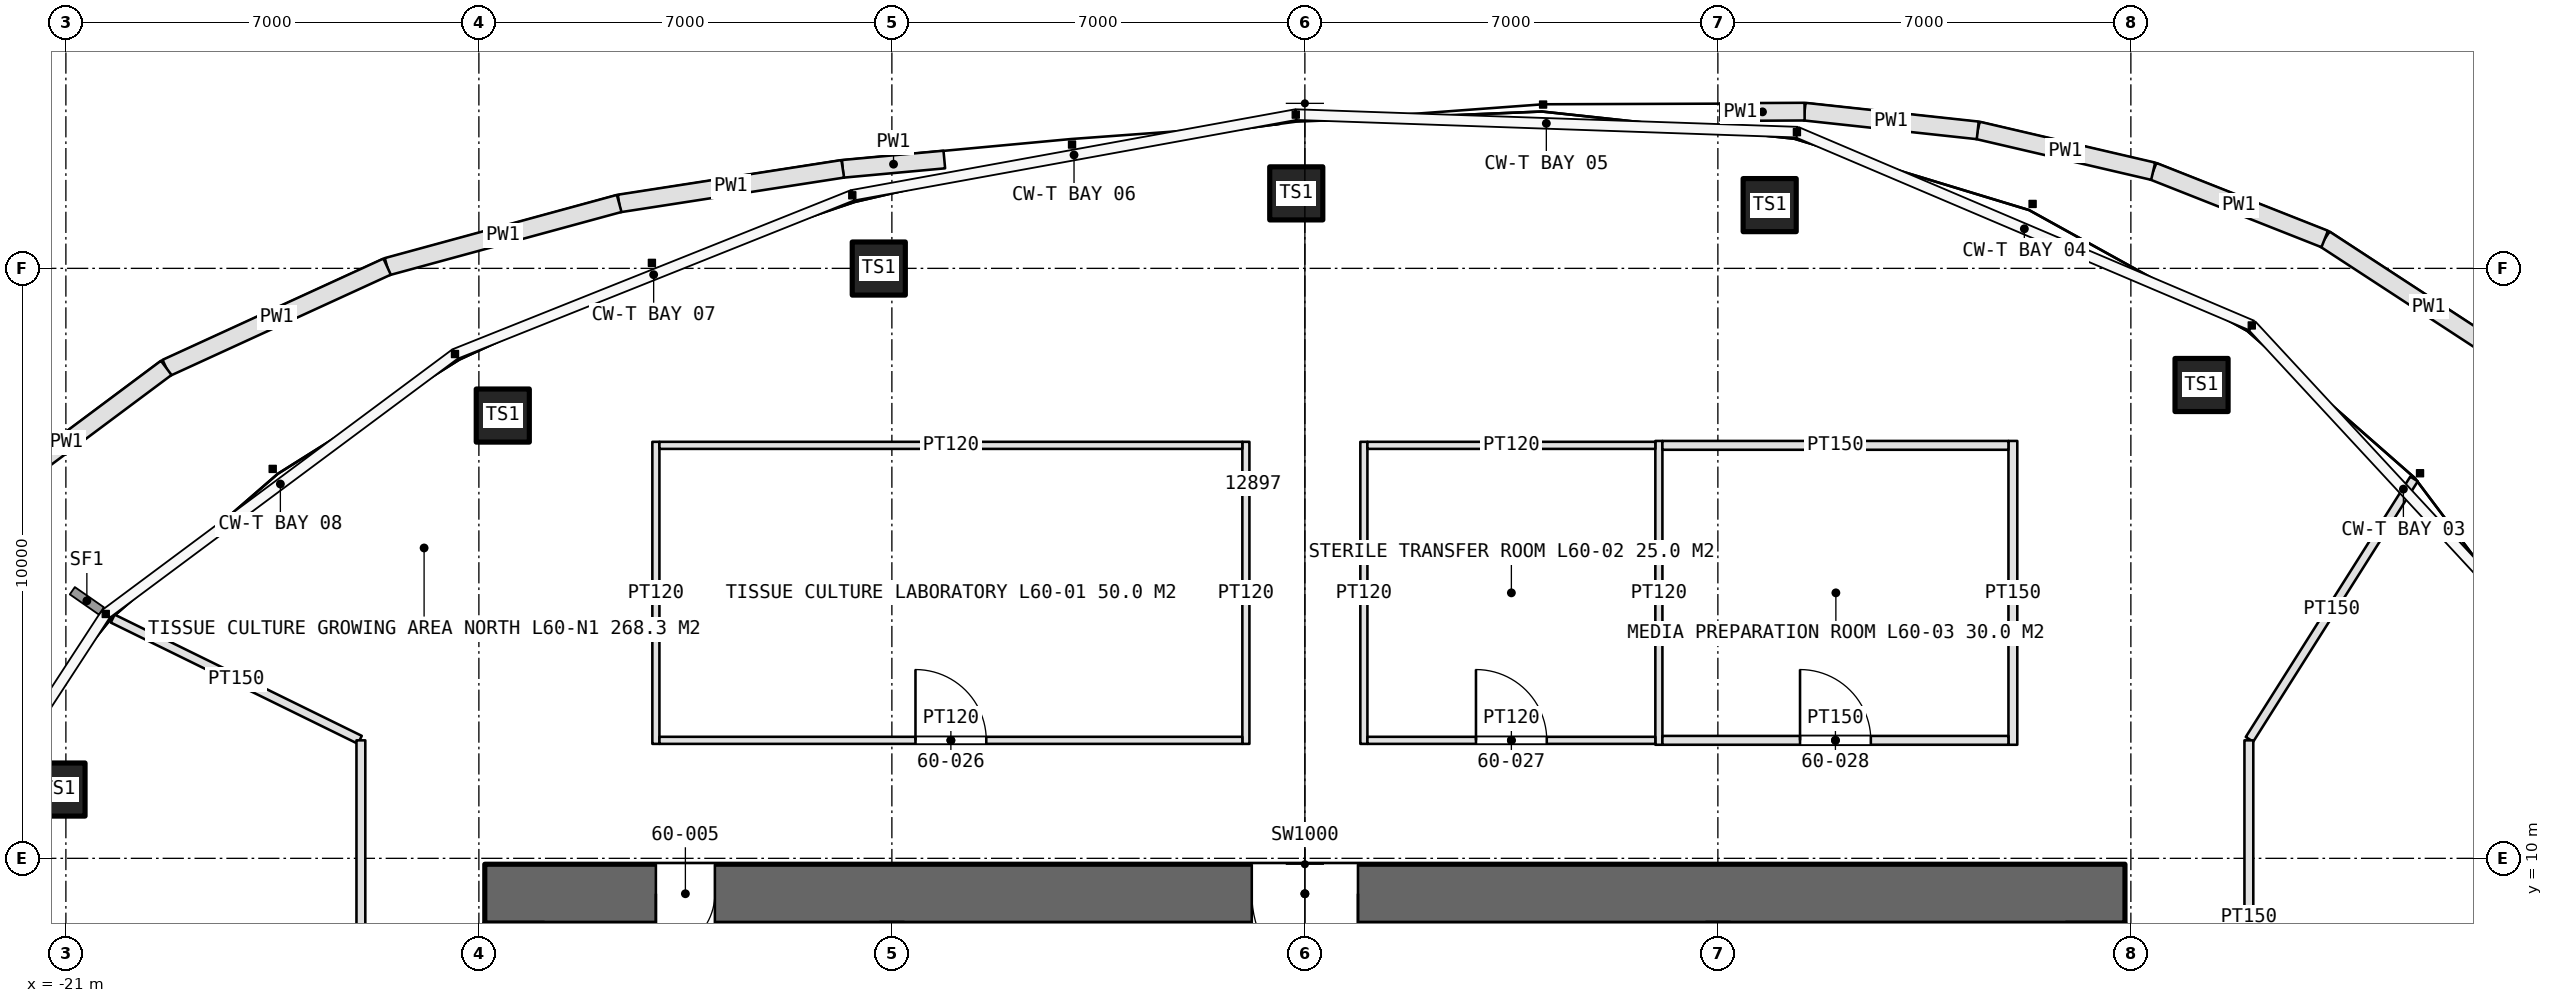
"""IFC4 building model, lengths in metres.
Left out: names, types, materials, properties, quantities, classifications, styles, units other than length and angle.
Written with IfcOpenShell. Run it as: python <this file> out.ifc"""

import sys

from ifc_helpers import new_model, si_unit, direction, frame, frame_2d, origin, origin_2d, place, context, subcontext, project, spatial, rectangle, hollow_rectangle, extrude, element, fill, save


model = new_model("IFC4")
c1 = context("Model", 3, precision=1e-05, world=origin(), true_north=direction((0.0, 1.0)))
c2 = subcontext(c1, "Body", "Model", "MODEL_VIEW")
j1 = project(units=[si_unit("LENGTHUNIT", "METRE"), si_unit("PLANEANGLEUNIT", "RADIAN")], contexts=[c1])
p1 = place(None, origin())
s1 = spatial("IfcSite", under=j1, at=p1, CompositionType="ELEMENT")
p2 = place(p1, origin())
s2 = spatial("IfcBuilding", under=s1, at=p2, CompositionType="ELEMENT")
p3 = place(p2, frame((0.0, 0.0, 271.2)))
s3 = spatial("IfcBuildingStorey", under=s2, at=p3, CompositionType="ELEMENT", Elevation=271.2)
p4 = place(p3, frame((13.9, 9.4, 0.0), z_axis=(0.0, 0.0, 1.0), x_axis=(-1.0, 0.0, 0.0)))
e1 = element("IfcWall", 1, at=p4, inside=s3, PredefinedType="SHEAR", context=c2, shape_type="SweptSolid", body=[
    extrude(rectangle(XDim=27.8, YDim=1.0, at=frame_2d((13.9, 0.0))), origin(), (0.0, 0.0, 1.0), 4.2),
])
p5 = place(p4, frame((23.9, 0.0, 0.0)))
e2 = element("IfcOpeningElement", 2, at=p5, cuts=e1, PredefinedType="OPENING", context=c2, shape_type="SweptSolid", body=[
    extrude(rectangle(XDim=1.0, YDim=2.4, at=frame_2d((0.5, 1.2))), frame((0.0, 0.51, 0.0), z_axis=(0.0, -1.0, 0.0), x_axis=(1.0, 0.0, 0.0)), (0.0, 0.0, 1.0), 1.02),
])
p6 = place(p4, frame((13.0, 0.0, 0.0)))
e3 = element("IfcOpeningElement", 3, at=p6, cuts=e1, PredefinedType="OPENING", context=c2, shape_type="SweptSolid", body=[
    extrude(rectangle(XDim=1.8, YDim=2.4, at=frame_2d((0.9, 1.2))), frame((0.0, 0.51, 0.0), z_axis=(0.0, -1.0, 0.0), x_axis=(1.0, 0.0, 0.0)), (0.0, 0.0, 1.0), 1.02),
])
p7 = place(p3, frame((15.198, 18.023, 0.775), z_axis=(0.0, 0.0, 1.0), x_axis=(1.0, 0.0, 0.0)))
e4 = element("IfcColumn", 4, at=p7, inside=s3, PredefinedType="COLUMN", context=c2, shape_type="SweptSolid", body=[
    extrude(hollow_rectangle(XDim=0.9, YDim=0.9, WallThickness=0.08, at=origin_2d()), origin(), (0.0, 0.0, 1.0), 3.425),
])
for number, where, z_axis, x_axis in (
    (5, (7.878, 21.072, 0.0), (0.0, 0.0, 1.0), (1.0, 0.0, 0.0)),
    (6, (-0.146, 21.271, 0.0), (0.0, 0.0, 1.0), (1.0, 0.0, 0.0)),
    (7, (-7.222, 19.997, 0.0), (0.0, 0.0, 1.0), (1.0, 0.0, 0.0)),
):
    element("IfcColumn", number, at=place(p3, frame(where, z_axis=z_axis, x_axis=x_axis)), inside=s3, PredefinedType="COLUMN", context=c2, shape_type="SweptSolid", body=[
        extrude(hollow_rectangle(XDim=0.9, YDim=0.9, WallThickness=0.08, at=origin_2d()), origin(), (0.0, 0.0, 1.0), 4.2),
    ])
for number, where, z_axis, x_axis in (
    (8, (-13.595, 17.505, 0.775), (0.0, 0.0, 1.0), (1.0, 0.0, 0.0)),
    (9, (-21.125, 11.166, 0.775), (0.0, 0.0, 1.0), (1.0, 0.0, 0.0)),
):
    element("IfcColumn", number, at=place(p3, frame(where, z_axis=z_axis, x_axis=x_axis)), inside=s3, PredefinedType="COLUMN", context=c2, shape_type="SweptSolid", body=[
        extrude(hollow_rectangle(XDim=0.9, YDim=0.9, WallThickness=0.08, at=origin_2d()), origin(), (0.0, 0.0, 1.0), 3.425),
    ])
p8 = place(p3, frame((20.81, 18.197, 0.0), z_axis=(0.0, 0.0, 1.0), x_axis=(-0.837303557123, 0.546738285863, 0.0)))
e10 = element("IfcWall", 10, at=p8, inside=s3, PredefinedType="PARAPET", context=c2, shape_type="SweptSolid", body=[
    extrude(rectangle(XDim=4.209, YDim=0.3, at=frame_2d((2.105, 0.0))), origin(), (0.0, 0.0, 1.0), 1.1),
])
p9 = place(p3, frame((17.285, 20.498, 0.0), z_axis=(0.0, 0.0, 1.0), x_axis=(-0.93007307549, 0.36737456941, 0.0)))
e11 = element("IfcWall", 11, at=p9, inside=s3, PredefinedType="PARAPET", context=c2, shape_type="SweptSolid", body=[
    extrude(rectangle(XDim=3.126, YDim=0.3, at=frame_2d((1.563, 0.0))), origin(), (0.0, 0.0, 1.0), 1.1),
])
p10 = place(p3, frame((14.378, 21.646, 0.0), z_axis=(0.0, 0.0, 1.0), x_axis=(-0.973947271166, 0.226774586291, 0.0)))
e12 = element("IfcWall", 12, at=p10, inside=s3, PredefinedType="PARAPET", context=c2, shape_type="SweptSolid", body=[
    extrude(rectangle(XDim=3.053, YDim=0.3, at=frame_2d((1.527, 0.0))), origin(), (0.0, 0.0, 1.0), 1.1),
])
p11 = place(p3, frame((11.404, 22.339, 0.0), z_axis=(0.0, 0.0, 1.0), x_axis=(-0.994202268976, 0.107526035746, 0.0)))
e13 = element("IfcWall", 13, at=p11, inside=s3, PredefinedType="PARAPET", context=c2, shape_type="SweptSolid", body=[
    extrude(rectangle(XDim=2.952, YDim=0.3, at=frame_2d((1.476, 0.0))), origin(), (0.0, 0.0, 1.0), 1.1),
])
p12 = place(p3, frame((8.47, 22.656, 0.0), z_axis=(0.0, 0.0, 1.0), x_axis=(-0.999986833016, -0.005131646423, 0.0)))
e14 = element("IfcWall", 14, at=p12, inside=s3, PredefinedType="PARAPET", context=c2, shape_type="SweptSolid", body=[
    extrude(rectangle(XDim=1.427, YDim=0.3, at=frame_2d((0.714, 0.0))), origin(), (0.0, 0.0, 1.0), 1.1),
])
p13 = place(p3, frame((-6.111, 21.845, 0.0), z_axis=(0.0, 0.0, 1.0), x_axis=(-0.995803587649, -0.091516199801, 0.0)))
e15 = element("IfcWall", 15, at=p13, inside=s3, PredefinedType="PARAPET", context=c2, shape_type="SweptSolid", body=[
    extrude(rectangle(XDim=1.729, YDim=0.3, at=frame_2d((0.864, 0.0))), origin(), (0.0, 0.0, 1.0), 1.1),
])
p14 = place(p3, frame((-7.833, 21.687, 0.0), z_axis=(0.0, 0.0, 1.0), x_axis=(-0.988226241956, -0.152999655913, 0.0)))
e16 = element("IfcWall", 16, at=p14, inside=s3, PredefinedType="PARAPET", context=c2, shape_type="SweptSolid", body=[
    extrude(rectangle(XDim=3.834, YDim=0.3, at=frame_2d((1.917, 0.0))), origin(), (0.0, 0.0, 1.0), 1.1),
])
p15 = place(p3, frame((-11.622, 21.1, 0.0), z_axis=(0.0, 0.0, 1.0), x_axis=(-0.964883960715, -0.262676497529, 0.0)))
e17 = element("IfcWall", 17, at=p15, inside=s3, PredefinedType="PARAPET", context=c2, shape_type="SweptSolid", body=[
    extrude(rectangle(XDim=4.076, YDim=0.3, at=frame_2d((2.038, 0.0))), origin(), (0.0, 0.0, 1.0), 1.1),
])
p16 = place(p3, frame((-15.555, 20.029, 0.0), z_axis=(0.0, 0.0, 1.0), x_axis=(-0.909054531589, -0.416677163518, 0.0)))
e18 = element("IfcWall", 18, at=p16, inside=s3, PredefinedType="PARAPET", context=c2, shape_type="SweptSolid", body=[
    extrude(rectangle(XDim=4.118, YDim=0.3, at=frame_2d((2.059, 0.0))), origin(), (0.0, 0.0, 1.0), 1.1),
])
p17 = place(p3, frame((-19.299, 18.313, 0.0), z_axis=(0.0, 0.0, 1.0), x_axis=(-0.801453362937, -0.598057277388, 0.0)))
e19 = element("IfcWall", 19, at=p17, inside=s3, PredefinedType="PARAPET", context=c2, shape_type="SweptSolid", body=[
    extrude(rectangle(XDim=4.226, YDim=0.3, at=frame_2d((2.113, 0.0))), origin(), (0.0, 0.0, 1.0), 1.1),
])
for number, where, z_axis, x_axis in (
    (20, (-11.0, 11.94, 0.0), (0.0, 0.0, 1.0), (0.0, 1.0, 0.0)),
    (21, (-1.0, 11.94, 0.0), (0.0, 0.0, 1.0), (0.0, 1.0, 0.0)),
):
    element("IfcWall", number, at=place(p3, frame(where, z_axis=z_axis, x_axis=x_axis)), inside=s3, PredefinedType="PARTITIONING", context=c2, shape_type="SweptSolid", body=[
        extrude(rectangle(XDim=5.12, YDim=0.12, at=frame_2d((2.56, 0.0))), origin(), (0.0, 0.0, 1.0), 3.0),
    ])
p18 = place(p3, frame((-10.94, 12.0, 0.0), z_axis=(0.0, 0.0, 1.0), x_axis=(1.0, 0.0, 0.0)))
e22 = element("IfcWall", 22, at=p18, inside=s3, PredefinedType="PARTITIONING", context=c2, shape_type="SweptSolid", body=[
    extrude(rectangle(XDim=9.88, YDim=0.12, at=frame_2d((4.94, 0.0))), origin(), (0.0, 0.0, 1.0), 3.0),
])
p19 = place(p18, frame((4.34, 0.0, 0.0)))
e23 = element("IfcOpeningElement", 23, at=p19, cuts=e22, PredefinedType="OPENING", context=c2, shape_type="SweptSolid", body=[
    extrude(rectangle(XDim=1.2, YDim=2.3, at=frame_2d((0.6, 1.15))), frame((0.0, 0.07, 0.0), z_axis=(0.0, -1.0, 0.0), x_axis=(1.0, 0.0, 0.0)), (0.0, 0.0, 1.0), 0.14),
])
p20 = place(p3, frame((-10.94, 17.0, 0.0), z_axis=(0.0, 0.0, 1.0), x_axis=(1.0, 0.0, 0.0)))
e24 = element("IfcWall", 24, at=p20, inside=s3, PredefinedType="PARTITIONING", context=c2, shape_type="SweptSolid", body=[
    extrude(rectangle(XDim=9.88, YDim=0.12, at=frame_2d((4.94, 0.0))), origin(), (0.0, 0.0, 1.0), 3.0),
])
p21 = place(p3, frame((1.0, 11.94, 0.0), z_axis=(0.0, 0.0, 1.0), x_axis=(0.0, 1.0, 0.0)))
e25 = element("IfcWall", 25, at=p21, inside=s3, PredefinedType="PARTITIONING", context=c2, shape_type="SweptSolid", body=[
    extrude(rectangle(XDim=5.12, YDim=0.12, at=frame_2d((2.56, 0.0))), origin(), (0.0, 0.0, 1.0), 3.0),
])
p22 = place(p3, frame((6.0, 11.925, 0.0), z_axis=(0.0, 0.0, 1.0), x_axis=(0.0, 1.0, 0.0)))
e26 = element("IfcWall", 26, at=p22, inside=s3, PredefinedType="PARTITIONING", context=c2, shape_type="SweptSolid", body=[
    extrude(rectangle(XDim=5.15, YDim=0.12, at=frame_2d((2.575, 0.0))), origin(), (0.0, 0.0, 1.0), 3.0),
])
p23 = place(p3, frame((12.0, 11.925, 0.0), z_axis=(0.0, 0.0, 1.0), x_axis=(0.0, 1.0, 0.0)))
e27 = element("IfcWall", 27, at=p23, inside=s3, PredefinedType="PARTITIONING", context=c2, shape_type="SweptSolid", body=[
    extrude(rectangle(XDim=5.15, YDim=0.15, at=frame_2d((2.575, 0.0))), origin(), (0.0, 0.0, 1.0), 3.0),
])
p24 = place(p3, frame((1.06, 12.0, 0.0), z_axis=(0.0, 0.0, 1.0), x_axis=(1.0, 0.0, 0.0)))
e28 = element("IfcWall", 28, at=p24, inside=s3, PredefinedType="PARTITIONING", context=c2, shape_type="SweptSolid", body=[
    extrude(rectangle(XDim=4.88, YDim=0.12, at=frame_2d((2.44, 0.0))), origin(), (0.0, 0.0, 1.0), 3.0),
])
p25 = place(p24, frame((1.84, 0.0, 0.0)))
e29 = element("IfcOpeningElement", 29, at=p25, cuts=e28, PredefinedType="OPENING", context=c2, shape_type="SweptSolid", body=[
    extrude(rectangle(XDim=1.2, YDim=2.3, at=frame_2d((0.6, 1.15))), frame((0.0, 0.07, 0.0), z_axis=(0.0, -1.0, 0.0), x_axis=(1.0, 0.0, 0.0)), (0.0, 0.0, 1.0), 0.14),
])
p26 = place(p3, frame((1.06, 17.0, 0.0), z_axis=(0.0, 0.0, 1.0), x_axis=(1.0, 0.0, 0.0)))
e30 = element("IfcWall", 30, at=p26, inside=s3, PredefinedType="PARTITIONING", context=c2, shape_type="SweptSolid", body=[
    extrude(rectangle(XDim=4.88, YDim=0.12, at=frame_2d((2.44, 0.0))), origin(), (0.0, 0.0, 1.0), 3.0),
])
p27 = place(p3, frame((6.06, 12.0, 0.0), z_axis=(0.0, 0.0, 1.0), x_axis=(1.0, 0.0, 0.0)))
e31 = element("IfcWall", 31, at=p27, inside=s3, PredefinedType="PARTITIONING", context=c2, shape_type="SweptSolid", body=[
    extrude(rectangle(XDim=5.865, YDim=0.15, at=frame_2d((2.933, 0.0))), origin(), (0.0, 0.0, 1.0), 3.0),
])
p28 = place(p27, frame((2.333, 0.0, 0.0)))
e32 = element("IfcOpeningElement", 32, at=p28, cuts=e31, PredefinedType="OPENING", context=c2, shape_type="SweptSolid", body=[
    extrude(rectangle(XDim=1.2, YDim=2.3, at=frame_2d((0.6, 1.15))), frame((0.0, 0.085, 0.0), z_axis=(0.0, -1.0, 0.0), x_axis=(1.0, 0.0, 0.0)), (0.0, 0.0, 1.0), 0.17),
])
p29 = place(p3, frame((6.06, 17.0, 0.0), z_axis=(0.0, 0.0, 1.0), x_axis=(1.0, 0.0, 0.0)))
e33 = element("IfcWall", 33, at=p29, inside=s3, PredefinedType="PARTITIONING", context=c2, shape_type="SweptSolid", body=[
    extrude(rectangle(XDim=5.865, YDim=0.15, at=frame_2d((2.933, 0.0))), origin(), (0.0, 0.0, 1.0), 3.0),
])
p30 = place(p3, frame((-16.018, 12.009, 0.0), z_axis=(0.0, 0.0, 1.0), x_axis=(-0.897771840996, 0.440460805879, 0.0)))
e34 = element("IfcWall", 34, at=p30, inside=s3, PredefinedType="PARTITIONING", context=c2, shape_type="SweptSolid", body=[
    extrude(rectangle(XDim=4.666, YDim=0.15, at=frame_2d((2.333, 0.0))), origin(), (0.0, 0.0, 1.0), 3.0),
])
p31 = place(p3, frame((16.011, 12.017, 0.0), z_axis=(0.0, 0.0, 1.0), x_axis=(0.53415837449, 0.845384427916, 0.0)))
e35 = element("IfcWall", 35, at=p31, inside=s3, PredefinedType="PARTITIONING", context=c2, shape_type="SweptSolid", body=[
    extrude(rectangle(XDim=5.22, YDim=0.15, at=frame_2d((2.61, 0.0))), origin(), (0.0, 0.0, 1.0), 3.0),
])
p32 = place(p3, frame((16.0, 6.0, 0.0), z_axis=(0.0, 0.0, 1.0), x_axis=(0.0, 1.0, 0.0)))
e36 = element("IfcWall", 36, at=p32, inside=s3, PredefinedType="PARTITIONING", context=c2, shape_type="SweptSolid", body=[
    extrude(rectangle(XDim=6.0, YDim=0.15, at=frame_2d((3.0, 0.0))), origin(), (0.0, 0.0, 1.0), 3.0),
])
p33 = place(p3, frame((-16.0, 12.0, 0.0), z_axis=(0.0, 0.0, 1.0), x_axis=(0.0, -1.0, 0.0)))
e37 = element("IfcWall", 37, at=p33, inside=s3, PredefinedType="PARTITIONING", context=c2, shape_type="SweptSolid", body=[
    extrude(rectangle(XDim=8.0, YDim=0.15, at=frame_2d((4.0, 0.0))), origin(), (0.0, 0.0, 1.0), 3.0),
])
p34 = place(p33, frame((5.9, 0.0, 0.0)))
e38 = element("IfcOpeningElement", 38, at=p34, cuts=e37, PredefinedType="OPENING", context=c2, shape_type="SweptSolid", body=[
    extrude(rectangle(XDim=1.6, YDim=2.4, at=frame_2d((0.8, 1.2))), frame((0.0, 0.085, 0.0), z_axis=(0.0, -1.0, 0.0), x_axis=(1.0, 0.0, 0.0)), (0.0, 0.0, 1.0), 0.17),
])
p35 = place(p5, origin())
e39 = element("IfcDoor", 39, at=p35, inside=s3, OperationType="SINGLE_SWING_RIGHT", PredefinedType="DOOR", context=c2, shape_type="SweptSolid", body=[
    extrude(rectangle(XDim=1.0, YDim=2.4, at=frame_2d((0.5, 1.2))), frame((0.0, 0.025, 0.0), z_axis=(0.0, -1.0, 0.0), x_axis=(1.0, 0.0, 0.0)), (0.0, 0.0, 1.0), 0.05),
])
fill(e2, e39)
p36 = place(p6, origin())
e40 = element("IfcDoor", 40, at=p36, inside=s3, OperationType="DOUBLE_DOOR_SINGLE_SWING", PredefinedType="DOOR", context=c2, shape_type="SweptSolid", body=[
    extrude(rectangle(XDim=1.8, YDim=2.4, at=frame_2d((0.9, 1.2))), frame((0.0, 0.025, 0.0), z_axis=(0.0, -1.0, 0.0), x_axis=(1.0, 0.0, 0.0)), (0.0, 0.0, 1.0), 0.05),
])
fill(e3, e40)
p37 = place(p19, origin())
e41 = element("IfcDoor", 41, at=p37, inside=s3, OperationType="SINGLE_SWING_LEFT", PredefinedType="DOOR", context=c2, shape_type="SweptSolid", body=[
    extrude(rectangle(XDim=1.2, YDim=2.3, at=frame_2d((0.6, 1.15))), frame((0.0, 0.025, 0.0), z_axis=(0.0, -1.0, 0.0), x_axis=(1.0, 0.0, 0.0)), (0.0, 0.0, 1.0), 0.05),
])
fill(e23, e41)
p38 = place(p25, origin())
e42 = element("IfcDoor", 42, at=p38, inside=s3, OperationType="SINGLE_SWING_LEFT", PredefinedType="DOOR", context=c2, shape_type="SweptSolid", body=[
    extrude(rectangle(XDim=1.2, YDim=2.3, at=frame_2d((0.6, 1.15))), frame((0.0, 0.025, 0.0), z_axis=(0.0, -1.0, 0.0), x_axis=(1.0, 0.0, 0.0)), (0.0, 0.0, 1.0), 0.05),
])
fill(e29, e42)
p39 = place(p28, origin())
e43 = element("IfcDoor", 43, at=p39, inside=s3, OperationType="SINGLE_SWING_LEFT", PredefinedType="DOOR", context=c2, shape_type="SweptSolid", body=[
    extrude(rectangle(XDim=1.2, YDim=2.3, at=frame_2d((0.6, 1.15))), frame((0.0, 0.025, 0.0), z_axis=(0.0, -1.0, 0.0), x_axis=(1.0, 0.0, 0.0)), (0.0, 0.0, 1.0), 0.05),
])
fill(e32, e43)
save(model, sys.argv[1])
